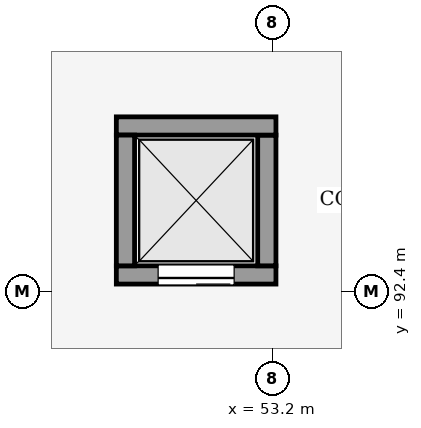
"""IFC4 building model, lengths in metres.
Left out: names, types, materials, properties, quantities, classifications, styles, units other than length and angle.
Written with IfcOpenShell. Run it as: python <this file> out.ifc"""

import sys

from ifc_helpers import new_model, si_unit, direction, frame, frame_2d, origin, place, context, subcontext, project, spatial, rectangle, extrude, element, fill, save


model = new_model("IFC4")
c1 = context("Model", 3, precision=1e-05, world=origin(), true_north=direction((0.0, 1.0)))
c2 = subcontext(c1, "Body", "Model", "MODEL_VIEW")
j1 = project(units=[si_unit("LENGTHUNIT", "METRE"), si_unit("PLANEANGLEUNIT", "RADIAN")], contexts=[c1])
p1 = place(None, origin())
s1 = spatial("IfcSite", under=j1, at=p1, CompositionType="ELEMENT")
p2 = place(p1, origin())
s2 = spatial("IfcBuilding", under=s1, at=p2, CompositionType="ELEMENT")
p3 = place(p2, frame((0.0, 0.0, 9.15)))
s3 = spatial("IfcBuildingStorey", under=s2, at=p3, CompositionType="ELEMENT", Elevation=9.15)
p4 = place(p3, frame((53.25, 92.62, 0.0), z_axis=(0.0, 0.0, 1.0), x_axis=(-1.0, 0.0, 0.0)))
e1 = element("IfcWall", 1, at=p4, inside=s3, PredefinedType="SHEAR", context=c2, shape_type="SweptSolid", body=[
    extrude(rectangle(XDim=2.1, YDim=0.24, at=frame_2d((1.05, 0.0))), origin(), (0.0, 0.0, 1.0), 4.05),
])
p5 = place(p4, frame((0.55, 0.0, 0.0)))
e2 = element("IfcOpeningElement", 2, at=p5, cuts=e1, PredefinedType="OPENING", context=c2, shape_type="SweptSolid", body=[
    extrude(rectangle(XDim=1.0, YDim=2.15, at=frame_2d((0.5, 1.075))), frame((0.0, 0.13, 0.0), z_axis=(0.0, -1.0, 0.0), x_axis=(1.0, 0.0, 0.0)), (0.0, 0.0, 1.0), 0.26),
])
p6 = place(p3, frame((53.13, 94.46, 0.0), z_axis=(0.0, 0.0, 1.0), x_axis=(0.0, -1.0, 0.0)))
e3 = element("IfcWall", 3, at=p6, inside=s3, PredefinedType="SHEAR", context=c2, shape_type="SweptSolid", body=[
    extrude(rectangle(XDim=1.72, YDim=0.24, at=frame_2d((0.86, 0.0))), origin(), (0.0, 0.0, 1.0), 4.05),
])
p7 = place(p3, frame((51.15, 94.58, 0.0), z_axis=(0.0, 0.0, 1.0), x_axis=(1.0, 0.0, 0.0)))
e4 = element("IfcWall", 4, at=p7, inside=s3, PredefinedType="SHEAR", context=c2, shape_type="SweptSolid", body=[
    extrude(rectangle(XDim=2.1, YDim=0.24, at=frame_2d((1.05, 0.0))), origin(), (0.0, 0.0, 1.0), 4.05),
])
p8 = place(p3, frame((51.27, 92.74, 0.0), z_axis=(0.0, 0.0, 1.0), x_axis=(0.0, 1.0, 0.0)))
e5 = element("IfcWall", 5, at=p8, inside=s3, PredefinedType="SHEAR", context=c2, shape_type="SweptSolid", body=[
    extrude(rectangle(XDim=1.72, YDim=0.24, at=frame_2d((0.86, 0.0))), origin(), (0.0, 0.0, 1.0), 4.05),
])
p9 = place(p5, origin())
e6 = element("IfcDoor", 6, at=p9, inside=s3, OperationType="SLIDING_TO_LEFT", PredefinedType="DOOR", context=c2, shape_type="SweptSolid", body=[
    extrude(rectangle(XDim=1.0, YDim=2.15, at=frame_2d((0.5, 1.075))), frame((0.0, 0.025, 0.0), z_axis=(0.0, -1.0, 0.0), x_axis=(1.0, 0.0, 0.0)), (0.0, 0.0, 1.0), 0.05),
])
fill(e2, e6)
save(model, sys.argv[1])
